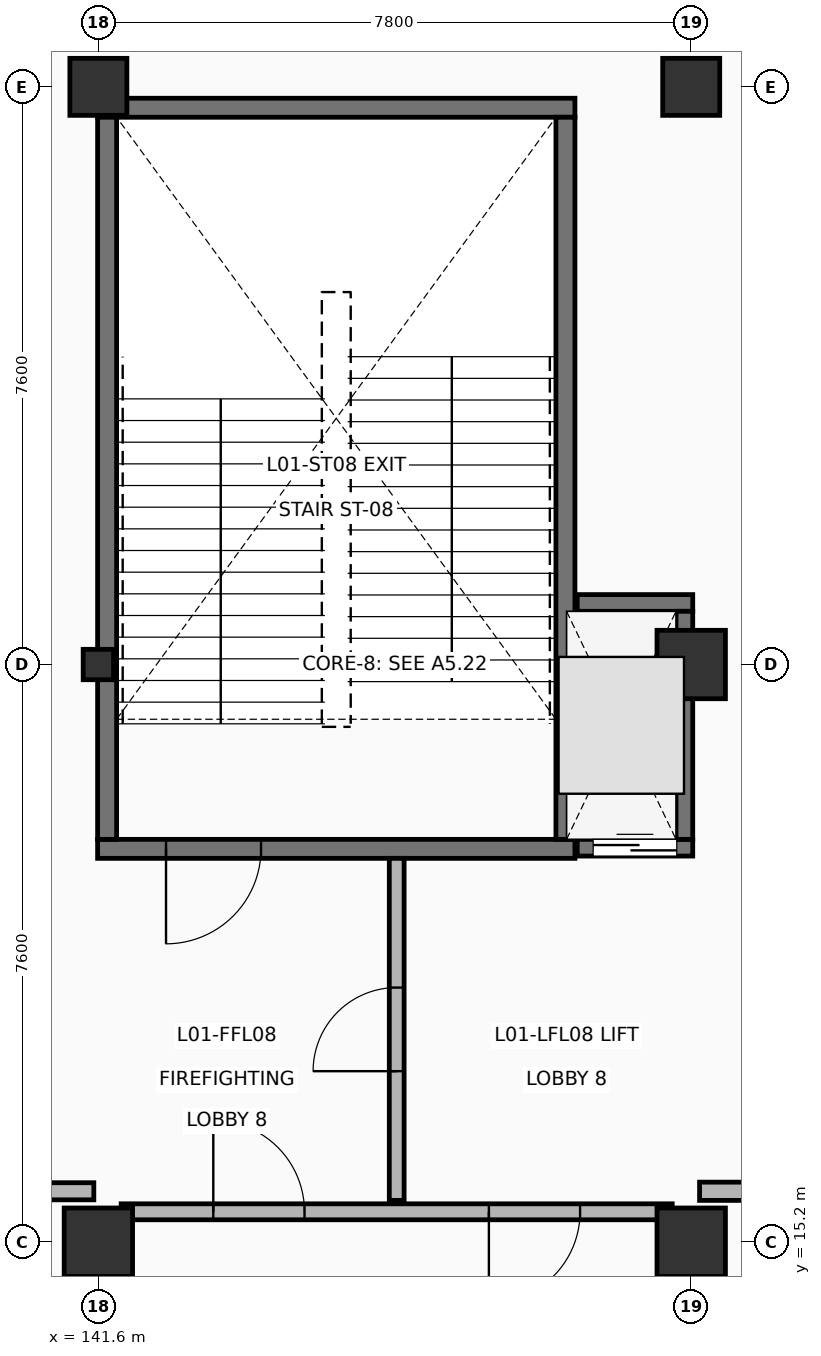
"""IFC4 building model, lengths in metres.
Left out: names, types, materials, properties, quantities, classifications, styles, units other than length and angle.
Written with IfcOpenShell. Run it as: python <this file> out.ifc"""

import sys

from ifc_helpers import new_model, si_unit, direction, frame, frame_2d, origin, origin_2d, place, context, subcontext, project, spatial, rectangle, hollow_rectangle, circle, extrude, element, fill, save


model = new_model("IFC4")
c1 = context("Model", 3, precision=1e-05, world=origin(), true_north=direction((0.0, 1.0)))
c2 = subcontext(c1, "Body", "Model", "MODEL_VIEW")
j1 = project(units=[si_unit("LENGTHUNIT", "METRE"), si_unit("PLANEANGLEUNIT", "RADIAN")], contexts=[c1])
p1 = place(None, origin())
s1 = spatial("IfcSite", under=j1, at=p1, CompositionType="ELEMENT")
p2 = place(p1, origin())
s2 = spatial("IfcBuilding", under=s1, at=p2, CompositionType="ELEMENT")
p3 = place(p2, origin())
s3 = spatial("IfcBuildingStorey", under=s2, at=p3, CompositionType="ELEMENT", Elevation=0.0)
p4 = place(p3, frame((141.6, 15.2, 0.0), z_axis=(0.0, 0.0, 1.0), x_axis=(1.0, 0.0, 0.0)))
e1 = element("IfcColumn", 1, at=p4, inside=s3, PredefinedType="COLUMN", context=c2, shape_type="SweptSolid", body=[
    extrude(rectangle(XDim=0.9, YDim=0.9, at=origin_2d()), origin(), (0.0, 0.0, 1.0), 5.4),
])
p5 = place(p3, frame((141.6, 22.8, 0.0), z_axis=(0.0, 0.0, 1.0), x_axis=(1.0, 0.0, 0.0)))
e2 = element("IfcColumn", 2, at=p5, inside=s3, PredefinedType="COLUMN", context=c2, shape_type="SweptSolid", body=[
    extrude(hollow_rectangle(XDim=0.4, YDim=0.4, WallThickness=0.016, at=origin_2d()), origin(), (0.0, 0.0, 1.0), 5.4),
])
p6 = place(p3, frame((141.6, 30.4, 0.0), z_axis=(0.0, 0.0, 1.0), x_axis=(1.0, 0.0, 0.0)))
e3 = element("IfcColumn", 3, at=p6, inside=s3, PredefinedType="COLUMN", context=c2, shape_type="SweptSolid", body=[
    extrude(circle(Radius=0.375, at=origin_2d()), origin(), (0.0, 0.0, 1.0), 5.4),
])
for number, where, z_axis, x_axis in (
    (4, (149.4, 15.2, 0.0), (0.0, 0.0, 1.0), (1.0, 0.0, 0.0)),
    (5, (149.4, 22.8, 0.0), (0.0, 0.0, 1.0), (1.0, 0.0, 0.0)),
):
    element("IfcColumn", number, at=place(p3, frame(where, z_axis=z_axis, x_axis=x_axis)), inside=s3, PredefinedType="COLUMN", context=c2, shape_type="SweptSolid", body=[
        extrude(rectangle(XDim=0.9, YDim=0.9, at=origin_2d()), origin(), (0.0, 0.0, 1.0), 5.4),
    ])
p7 = place(p3, frame((149.4, 30.4, 0.0), z_axis=(0.0, 0.0, 1.0), x_axis=(1.0, 0.0, 0.0)))
e6 = element("IfcColumn", 6, at=p7, inside=s3, PredefinedType="COLUMN", context=c2, shape_type="SweptSolid", body=[
    extrude(circle(Radius=0.375, at=origin_2d()), origin(), (0.0, 0.0, 1.0), 5.4),
])
p8 = place(p3, frame((141.59, 20.375, 0.0), z_axis=(0.0, 0.0, 1.0), x_axis=(1.0, 0.0, 0.0)))
e7 = element("IfcWall", 7, at=p8, inside=s3, PredefinedType="SHEAR", context=c2, shape_type="SweptSolid", body=[
    extrude(rectangle(XDim=6.28, YDim=0.25, at=frame_2d((3.14, 0.0))), origin(), (0.0, 0.0, 1.0), 5.12),
])
p9 = place(p8, frame((0.9, 0.0, 0.0)))
e8 = element("IfcOpeningElement", 8, at=p9, cuts=e7, PredefinedType="OPENING", context=c2, shape_type="SweptSolid", body=[
    extrude(rectangle(XDim=1.25, YDim=2.2, at=frame_2d((0.625, 1.1))), frame((0.0, 0.135, 0.0), z_axis=(0.0, -1.0, 0.0), x_axis=(1.0, 0.0, 0.0)), (0.0, 0.0, 1.0), 0.27),
])
p10 = place(p3, frame((141.59, 30.125, 0.0), z_axis=(0.0, 0.0, 1.0), x_axis=(1.0, 0.0, 0.0)))
e9 = element("IfcWall", 9, at=p10, inside=s3, PredefinedType="SHEAR", context=c2, shape_type="SweptSolid", body=[
    extrude(rectangle(XDim=6.28, YDim=0.25, at=frame_2d((3.14, 0.0))), origin(), (0.0, 0.0, 1.0), 5.12),
])
for number, where, z_axis, x_axis in (
    (10, (141.715, 20.5, 0.0), (0.0, 0.0, 1.0), (0.0, 1.0, 0.0)),
    (11, (147.745, 20.5, 0.0), (0.0, 0.0, 1.0), (0.0, 1.0, 0.0)),
):
    element("IfcWall", number, at=place(p3, frame(where, z_axis=z_axis, x_axis=x_axis)), inside=s3, PredefinedType="SHEAR", context=c2, shape_type="SweptSolid", body=[
        extrude(rectangle(XDim=9.5, YDim=0.25, at=frame_2d((4.75, 0.0))), origin(), (0.0, 0.0, 1.0), 5.12),
    ])
p11 = place(p3, frame((147.9, 20.39, 0.0), z_axis=(0.0, 0.0, 1.0), x_axis=(1.0, 0.0, 0.0)))
e12 = element("IfcWall", 12, at=p11, inside=s3, PredefinedType="SHEAR", context=c2, shape_type="SweptSolid", body=[
    extrude(rectangle(XDim=1.52, YDim=0.22, at=frame_2d((0.76, 0.0))), origin(), (0.0, 0.0, 1.0), 5.12),
])
p12 = place(p11, frame((0.21, 0.0, 0.0)))
e13 = element("IfcOpeningElement", 13, at=p12, cuts=e12, PredefinedType="OPENING", context=c2, shape_type="SweptSolid", body=[
    extrude(rectangle(XDim=1.1, YDim=2.15, at=frame_2d((0.55, 1.075))), frame((0.0, 0.12, 0.0), z_axis=(0.0, -1.0, 0.0), x_axis=(1.0, 0.0, 0.0)), (0.0, 0.0, 1.0), 0.24),
])
p13 = place(p3, frame((147.9, 23.61, 0.0), z_axis=(0.0, 0.0, 1.0), x_axis=(1.0, 0.0, 0.0)))
e14 = element("IfcWall", 14, at=p13, inside=s3, PredefinedType="SHEAR", context=c2, shape_type="SweptSolid", body=[
    extrude(rectangle(XDim=1.52, YDim=0.22, at=frame_2d((0.76, 0.0))), origin(), (0.0, 0.0, 1.0), 5.12),
])
p14 = place(p3, frame((149.31, 20.5, 0.0), z_axis=(0.0, 0.0, 1.0), x_axis=(0.0, 1.0, 0.0)))
e15 = element("IfcWall", 15, at=p14, inside=s3, PredefinedType="SHEAR", context=c2, shape_type="SweptSolid", body=[
    extrude(rectangle(XDim=3.0, YDim=0.22, at=frame_2d((1.5, 0.0))), origin(), (0.0, 0.0, 1.0), 5.12),
])
p15 = place(p3, frame((141.9, 15.6, 0.0), z_axis=(0.0, 0.0, 1.0), x_axis=(1.0, 0.0, 0.0)))
e16 = element("IfcWall", 16, at=p15, inside=s3, PredefinedType="PARTITIONING", context=c2, shape_type="SweptSolid", body=[
    extrude(rectangle(XDim=7.25, YDim=0.21, at=frame_2d((3.625, 0.0))), origin(), (0.0, 0.0, 1.0), 5.12),
])
p16 = place(p15, frame((1.212, 0.0, 0.0)))
e17 = element("IfcOpeningElement", 17, at=p16, cuts=e16, PredefinedType="OPENING", context=c2, shape_type="SweptSolid", body=[
    extrude(rectangle(XDim=1.2, YDim=2.2, at=frame_2d((0.6, 1.1))), frame((0.0, 0.115, 0.0), z_axis=(0.0, -1.0, 0.0), x_axis=(1.0, 0.0, 0.0)), (0.0, 0.0, 1.0), 0.23),
])
p17 = place(p15, frame((4.838, 0.0, 0.0)))
e18 = element("IfcOpeningElement", 18, at=p17, cuts=e16, PredefinedType="OPENING", context=c2, shape_type="SweptSolid", body=[
    extrude(rectangle(XDim=1.2, YDim=2.2, at=frame_2d((0.6, 1.1))), frame((0.0, 0.115, 0.0), z_axis=(0.0, -1.0, 0.0), x_axis=(1.0, 0.0, 0.0)), (0.0, 0.0, 1.0), 0.23),
])
p18 = place(p3, frame((145.525, 15.75, 0.0), z_axis=(0.0, 0.0, 1.0), x_axis=(0.0, 1.0, 0.0)))
e19 = element("IfcWall", 19, at=p18, inside=s3, PredefinedType="PARTITIONING", context=c2, shape_type="SweptSolid", body=[
    extrude(rectangle(XDim=4.5, YDim=0.195, at=frame_2d((2.25, 0.0))), origin(), (0.0, 0.0, 1.0), 5.12),
])
p19 = place(p18, frame((1.7, 0.0, 0.0)))
e20 = element("IfcOpeningElement", 20, at=p19, cuts=e19, PredefinedType="OPENING", context=c2, shape_type="SweptSolid", body=[
    extrude(rectangle(XDim=1.1, YDim=2.15, at=frame_2d((0.55, 1.075))), frame((0.0, 0.107, 0.0), z_axis=(0.0, -1.0, 0.0), x_axis=(1.0, 0.0, 0.0)), (0.0, 0.0, 1.0), 0.215),
])
p20 = place(p3, frame((149.51, 15.87, 0.0), z_axis=(0.0, 0.0, 1.0), x_axis=(1.0, 0.0, 0.0)))
e21 = element("IfcWall", 21, at=p20, inside=s3, PredefinedType="PARTITIONING", context=c2, shape_type="SweptSolid", body=[
    extrude(rectangle(XDim=15.17, YDim=0.24, at=frame_2d((7.585, 0.0))), origin(), (0.0, 0.0, 1.0), 4.422),
])
p21 = place(p20, frame((6.71, 0.0, 0.0)))
e22 = element("IfcOpeningElement", 22, at=p21, cuts=e21, PredefinedType="OPENING", context=c2, shape_type="SweptSolid", body=[
    extrude(rectangle(XDim=1.75, YDim=2.35, at=frame_2d((0.875, 1.175))), frame((0.0, 0.13, 0.0), z_axis=(0.0, -1.0, 0.0), x_axis=(1.0, 0.0, 0.0)), (0.0, 0.0, 1.0), 0.26),
])
p22 = place(p3, frame((134.172, 15.87, 0.0), z_axis=(0.0, 0.0, 1.0), x_axis=(1.0, 0.0, 0.0)))
e23 = element("IfcWall", 23, at=p22, inside=s3, PredefinedType="PARTITIONING", context=c2, shape_type="SweptSolid", body=[
    extrude(rectangle(XDim=7.368, YDim=0.225, at=frame_2d((3.684, 0.0))), origin(), (0.0, 0.0, 1.0), 4.422),
])
p23 = place(p9, origin())
e24 = element("IfcDoor", 24, at=p23, inside=s3, OperationType="SINGLE_SWING_RIGHT", PredefinedType="DOOR", context=c2, shape_type="SweptSolid", body=[
    extrude(rectangle(XDim=1.25, YDim=2.2, at=frame_2d((0.625, 1.1))), frame((0.0, 0.025, 0.0), z_axis=(0.0, -1.0, 0.0), x_axis=(1.0, 0.0, 0.0)), (0.0, 0.0, 1.0), 0.05),
])
fill(e8, e24)
p24 = place(p12, origin())
e25 = element("IfcDoor", 25, at=p24, inside=s3, OperationType="DOUBLE_DOOR_SLIDING", PredefinedType="DOOR", context=c2, shape_type="SweptSolid", body=[
    extrude(rectangle(XDim=1.1, YDim=2.15, at=frame_2d((0.55, 1.075))), frame((0.0, 0.025, 0.0), z_axis=(0.0, -1.0, 0.0), x_axis=(1.0, 0.0, 0.0)), (0.0, 0.0, 1.0), 0.05),
])
fill(e13, e25)
p25 = place(p16, origin())
e26 = element("IfcDoor", 26, at=p25, inside=s3, OperationType="SINGLE_SWING_LEFT", PredefinedType="DOOR", context=c2, shape_type="SweptSolid", body=[
    extrude(rectangle(XDim=1.2, YDim=2.2, at=frame_2d((0.6, 1.1))), frame((0.0, 0.025, 0.0), z_axis=(0.0, -1.0, 0.0), x_axis=(1.0, 0.0, 0.0)), (0.0, 0.0, 1.0), 0.05),
])
fill(e17, e26)
p26 = place(p17, origin())
e27 = element("IfcDoor", 27, at=p26, inside=s3, OperationType="SINGLE_SWING_RIGHT", PredefinedType="DOOR", context=c2, shape_type="SweptSolid", body=[
    extrude(rectangle(XDim=1.2, YDim=2.2, at=frame_2d((0.6, 1.1))), frame((0.0, 0.025, 0.0), z_axis=(0.0, -1.0, 0.0), x_axis=(1.0, 0.0, 0.0)), (0.0, 0.0, 1.0), 0.05),
])
fill(e18, e27)
p27 = place(p19, origin())
e28 = element("IfcDoor", 28, at=p27, inside=s3, OperationType="SINGLE_SWING_LEFT", PredefinedType="DOOR", context=c2, shape_type="SweptSolid", body=[
    extrude(rectangle(XDim=1.1, YDim=2.15, at=frame_2d((0.55, 1.075))), frame((0.0, 0.025, 0.0), z_axis=(0.0, -1.0, 0.0), x_axis=(1.0, 0.0, 0.0)), (0.0, 0.0, 1.0), 0.05),
])
fill(e20, e28)
save(model, sys.argv[1])
